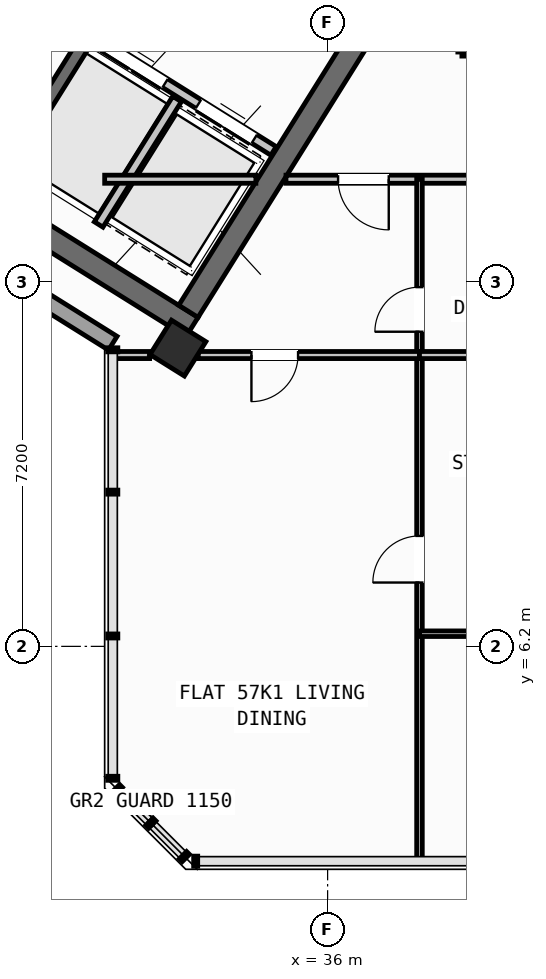
"""IFC4 building model, lengths in metres.
Left out: names, types, materials, properties, quantities, classifications, styles, units other than length and angle.
Written with IfcOpenShell. Run it as: python <this file> out.ifc"""

import sys

from ifc_helpers import new_model, si_unit, direction, frame, frame_2d, origin, origin_2d, place, context, subcontext, project, spatial, rectangle, hollow_rectangle, extrude, source, transform, mapped, element, fill, save


model = new_model("IFC4")
c1 = context("Model", 3, precision=1e-05, world=origin(), true_north=direction((0.0, 1.0)))
c2 = subcontext(c1, "Body", "Model", "MODEL_VIEW")
j1 = project(units=[si_unit("LENGTHUNIT", "METRE"), si_unit("PLANEANGLEUNIT", "RADIAN")], contexts=[c1])
p1 = place(None, origin())
s1 = spatial("IfcSite", under=j1, at=p1, CompositionType="ELEMENT")
p2 = place(p1, origin())
s2 = spatial("IfcBuilding", under=s1, at=p2, CompositionType="ELEMENT")
p3 = place(p2, frame((0.0, 0.0, 225.6)))
s3 = spatial("IfcBuildingStorey", under=s2, at=p3, CompositionType="ELEMENT", Elevation=225.6)
p4 = place(p3, frame((33.324, 12.503, 0.0), z_axis=(0.0, 0.0, 1.0), x_axis=(-0.848043529849, 0.529926571782, 0.0)))
e1 = element("IfcWall", 1, at=p4, inside=s3, PredefinedType="SHEAR", context=c2, shape_type="SweptSolid", body=[
    extrude(rectangle(XDim=13.04, YDim=0.45, at=frame_2d((6.52, 0.0))), origin(), (0.0, 0.0, 1.0), 3.35),
])
p5 = place(p3, frame((36.683, 18.304, 0.0), z_axis=(0.0, 0.0, 1.0), x_axis=(-0.529904039071, -0.848057609704, 0.0)))
e2 = element("IfcWall", 2, at=p5, inside=s3, PredefinedType="SHEAR", context=c2, shape_type="SweptSolid", body=[
    extrude(rectangle(XDim=6.475, YDim=0.45, at=frame_2d((3.238, 0.0))), origin(), (0.0, 0.0, 1.0), 3.35),
])
m1 = source(origin(), c2, "Body", "SweptSolid", [
    extrude(hollow_rectangle(XDim=0.8, YDim=0.8, WallThickness=0.032, at=origin_2d()), origin(), (0.0, 0.0, 1.0), 3.6),
])
p6 = place(p3, frame((33.046, 12.087, 0.0), z_axis=(0.0, 0.0, 1.0), x_axis=(-0.848048096156, 0.529919264233, 0.0)))
e3 = element("IfcColumn", 3, at=p6, inside=s3, PredefinedType="COLUMN", context=c2, shape_type="MappedRepresentation", body=[
    mapped(m1, transform((0.0, 0.0, 0.0), scale=1.0)),
])
p7 = place(p3, frame((31.76, 12.183, 0.0), z_axis=(0.0, 0.0, 1.0), x_axis=(-0.848047074256, 0.529920899612, 0.0)))
e4 = element("IfcWall", 4, at=p7, inside=s3, PredefinedType="STANDARD", context=c2, shape_type="SweptSolid", body=[
    extrude(rectangle(XDim=30.652, YDim=0.32, at=frame_2d((15.326, 0.0))), origin(), (0.0, 0.0, 1.0), 3.35),
])
p8 = place(p7, frame((15.166, 0.0, 0.0)))
e5 = element("IfcOpeningElement", 5, at=p8, cuts=e4, PredefinedType="OPENING", context=c2, shape_type="SweptSolid", body=[
    extrude(rectangle(XDim=1.2, YDim=2.15, at=frame_2d((0.6, 1.075))), frame((0.0, 0.17, 0.0), z_axis=(0.0, -1.0, 0.0), x_axis=(1.0, 0.0, 0.0)), (0.0, 0.0, 1.0), 0.34),
])
p9 = place(p7, frame((2.24, 0.0, 0.9)))
e6 = element("IfcOpeningElement", 6, at=p9, cuts=e4, PredefinedType="OPENING", context=c2, shape_type="SweptSolid", body=[
    extrude(rectangle(XDim=1.65, YDim=1.45, at=frame_2d((0.825, 0.725))), frame((0.0, 0.17, 0.0), z_axis=(0.0, -1.0, 0.0), x_axis=(1.0, 0.0, 0.0)), (0.0, 0.0, 1.0), 0.34),
])
p10 = place(p7, frame((7.469, 0.0, 0.9)))
e7 = element("IfcOpeningElement", 7, at=p10, cuts=e4, PredefinedType="OPENING", context=c2, shape_type="SweptSolid", body=[
    extrude(rectangle(XDim=1.65, YDim=1.45, at=frame_2d((0.825, 0.725))), frame((0.0, 0.17, 0.0), z_axis=(0.0, -1.0, 0.0), x_axis=(1.0, 0.0, 0.0)), (0.0, 0.0, 1.0), 0.34),
])
p11 = place(p7, frame((12.623, 0.0, 1.0)))
e8 = element("IfcOpeningElement", 8, at=p11, cuts=e4, PredefinedType="OPENING", context=c2, shape_type="SweptSolid", body=[
    extrude(rectangle(XDim=0.9, YDim=1.25, at=frame_2d((0.45, 0.625))), frame((0.0, 0.17, 0.0), z_axis=(0.0, -1.0, 0.0), x_axis=(1.0, 0.0, 0.0)), (0.0, 0.0, 1.0), 0.34),
])
p12 = place(p7, frame((19.556, 0.0, 1.0)))
e9 = element("IfcOpeningElement", 9, at=p12, cuts=e4, PredefinedType="OPENING", context=c2, shape_type="SweptSolid", body=[
    extrude(rectangle(XDim=0.9, YDim=1.25, at=frame_2d((0.45, 0.625))), frame((0.0, 0.17, 0.0), z_axis=(0.0, -1.0, 0.0), x_axis=(1.0, 0.0, 0.0)), (0.0, 0.0, 1.0), 0.34),
])
p13 = place(p7, frame((21.95, 0.0, 1.0)))
e10 = element("IfcOpeningElement", 10, at=p13, cuts=e4, PredefinedType="OPENING", context=c2, shape_type="SweptSolid", body=[
    extrude(rectangle(XDim=0.9, YDim=1.25, at=frame_2d((0.45, 0.625))), frame((0.0, 0.17, 0.0), z_axis=(0.0, -1.0, 0.0), x_axis=(1.0, 0.0, 0.0)), (0.0, 0.0, 1.0), 0.34),
])
p14 = place(p7, frame((26.983, 0.0, 0.9)))
e11 = element("IfcOpeningElement", 11, at=p14, cuts=e4, PredefinedType="OPENING", context=c2, shape_type="SweptSolid", body=[
    extrude(rectangle(XDim=1.35, YDim=1.45, at=frame_2d((0.675, 0.725))), frame((0.0, 0.17, 0.0), z_axis=(0.0, -1.0, 0.0), x_axis=(1.0, 0.0, 0.0)), (0.0, 0.0, 1.0), 0.34),
])
p15 = place(p3, frame((31.288, 18.256, 0.0), z_axis=(0.0, 0.0, 1.0), x_axis=(-0.529943379326, -0.848033026897, 0.0)))
e12 = element("IfcWall", 12, at=p15, inside=s3, PredefinedType="SHEAR", context=c2, shape_type="SweptSolid", body=[
    extrude(rectangle(XDim=3.16, YDim=0.26, at=frame_2d((1.58, 0.0))), origin(), (0.0, 0.0, 1.0), 3.35),
])
p16 = place(p3, frame((34.933, 15.978, 0.0), z_axis=(0.0, 0.0, 1.0), x_axis=(-0.848055739377, 0.529907032327, 0.0)))
e13 = element("IfcWall", 13, at=p16, inside=s3, PredefinedType="STANDARD", context=c2, shape_type="SweptSolid", body=[
    extrude(rectangle(XDim=4.298, YDim=0.2, at=frame_2d((2.149, 0.0))), origin(), (0.0, 0.0, 1.0), 3.34),
])
p17 = place(p16, frame((0.448, 0.0, 0.0)))
e14 = element("IfcOpeningElement", 14, at=p17, cuts=e13, PredefinedType="OPENING", context=c2, shape_type="SweptSolid", body=[
    extrude(rectangle(XDim=1.3, YDim=2.2, at=frame_2d((0.65, 1.1))), frame((0.0, 0.11, 0.0), z_axis=(0.0, -1.0, 0.0), x_axis=(1.0, 0.0, 0.0)), (0.0, 0.0, 1.0), 0.22),
])
p18 = place(p16, frame((2.523, 0.0, 0.0)))
e15 = element("IfcOpeningElement", 15, at=p18, cuts=e13, PredefinedType="OPENING", context=c2, shape_type="SweptSolid", body=[
    extrude(rectangle(XDim=1.45, YDim=2.25, at=frame_2d((0.725, 1.125))), frame((0.0, 0.11, 0.0), z_axis=(0.0, -1.0, 0.0), x_axis=(1.0, 0.0, 0.0)), (0.0, 0.0, 1.0), 0.22),
])
p19 = place(p3, frame((33.029, 17.003, 0.0), z_axis=(0.0, 0.0, 1.0), x_axis=(-0.529916267533, -0.848049968695, 0.0)))
e16 = element("IfcWall", 16, at=p19, inside=s3, PredefinedType="STANDARD", context=c2, shape_type="SweptSolid", body=[
    extrude(rectangle(XDim=2.92, YDim=0.2, at=frame_2d((1.46, 0.0))), origin(), (0.0, 0.0, 1.0), 3.34),
])
p20 = place(p3, frame((31.6, 15.42, 0.0), z_axis=(0.0, 0.0, 1.0), x_axis=(1.0, 0.0, 0.0)))
e17 = element("IfcWall", 17, at=p20, inside=s3, PredefinedType="PARTITIONING", context=c2, shape_type="SweptSolid", body=[
    extrude(rectangle(XDim=2.984, YDim=0.16, at=frame_2d((1.492, 0.0))), origin(), (0.0, 0.0, 1.0), 3.34),
])
p21 = place(p3, frame((35.178, 15.42, 0.0), z_axis=(0.0, 0.0, 1.0), x_axis=(1.0, 0.0, 0.0)))
e18 = element("IfcWall", 18, at=p21, inside=s3, PredefinedType="PARTITIONING", context=c2, shape_type="SweptSolid", body=[
    extrude(rectangle(XDim=15.552, YDim=0.16, at=frame_2d((7.776, 0.0))), origin(), (0.0, 0.0, 1.0), 3.34),
])
p22 = place(p21, frame((1.028, 0.0, 0.0)))
e19 = element("IfcOpeningElement", 19, at=p22, cuts=e18, PredefinedType="OPENING", context=c2, shape_type="SweptSolid", body=[
    extrude(rectangle(XDim=1.0, YDim=2.1, at=frame_2d((0.5, 1.05))), frame((0.0, 0.09, 0.0), z_axis=(0.0, -1.0, 0.0), x_axis=(1.0, 0.0, 0.0)), (0.0, 0.0, 1.0), 0.18),
])
p23 = place(p21, frame((8.858, 0.0, 0.0)))
e20 = element("IfcOpeningElement", 20, at=p23, cuts=e18, PredefinedType="OPENING", context=c2, shape_type="SweptSolid", body=[
    extrude(rectangle(XDim=1.0, YDim=2.1, at=frame_2d((0.5, 1.05))), frame((0.0, 0.09, 0.0), z_axis=(0.0, -1.0, 0.0), x_axis=(1.0, 0.0, 0.0)), (0.0, 0.0, 1.0), 0.18),
])
p24 = place(p3, frame((38.65, 17.93, 0.0), z_axis=(0.0, 0.0, 1.0), x_axis=(1.0, 0.0, 0.0)))
e21 = element("IfcWall", 21, at=p24, inside=s3, PredefinedType="PARTITIONING", context=c2, shape_type="SweptSolid", body=[
    extrude(rectangle(XDim=9.95, YDim=0.16, at=frame_2d((4.975, 0.0))), origin(), (0.0, 0.0, 1.0), 3.34),
])
p25 = place(p24, frame((4.475, 0.0, 0.0)))
e22 = element("IfcOpeningElement", 22, at=p25, cuts=e21, PredefinedType="OPENING", context=c2, shape_type="SweptSolid", body=[
    extrude(rectangle(XDim=1.0, YDim=2.1, at=frame_2d((0.5, 1.05))), frame((0.0, 0.09, 0.0), z_axis=(0.0, -1.0, 0.0), x_axis=(1.0, 0.0, 0.0)), (0.0, 0.0, 1.0), 0.18),
])
p26 = place(p3, frame((37.813, 1.96, 0.0), z_axis=(0.0, 0.0, 1.0), x_axis=(0.0, 1.0, 0.0)))
e23 = element("IfcWall", 23, at=p26, inside=s3, PredefinedType="PARTITIONING", context=c2, shape_type="SweptSolid", body=[
    extrude(rectangle(XDim=13.46, YDim=0.11, at=frame_2d((6.73, 0.0))), origin(), (0.0, 0.0, 1.0), 3.34),
])
p27 = place(p26, frame((5.5, 0.0, 0.0)))
e24 = element("IfcOpeningElement", 24, at=p27, cuts=e23, PredefinedType="OPENING", context=c2, shape_type="SweptSolid", body=[
    extrude(rectangle(XDim=0.92, YDim=2.08, at=frame_2d((0.46, 1.04))), frame((0.0, 0.065, 0.0), z_axis=(0.0, -1.0, 0.0), x_axis=(1.0, 0.0, 0.0)), (0.0, 0.0, 1.0), 0.13),
])
p28 = place(p26, frame((10.45, 0.0, 0.0)))
e25 = element("IfcOpeningElement", 25, at=p28, cuts=e23, PredefinedType="OPENING", context=c2, shape_type="SweptSolid", body=[
    extrude(rectangle(XDim=0.88, YDim=2.08, at=frame_2d((0.44, 1.04))), frame((0.0, 0.065, 0.0), z_axis=(0.0, -1.0, 0.0), x_axis=(1.0, 0.0, 0.0)), (0.0, 0.0, 1.0), 0.13),
])
p29 = place(p3, frame((31.74, 11.95, 0.0), z_axis=(0.0, 0.0, 1.0), x_axis=(1.0, 0.0, 0.0)))
e26 = element("IfcWall", 26, at=p29, inside=s3, PredefinedType="PLUMBINGWALL", context=c2, shape_type="SweptSolid", body=[
    extrude(rectangle(XDim=0.748, YDim=0.14, at=frame_2d((0.374, 0.0))), origin(), (0.0, 0.0, 1.0), 3.34),
])
p30 = place(p3, frame((33.447, 11.95, 0.0), z_axis=(0.0, 0.0, 1.0), x_axis=(1.0, 0.0, 0.0)))
e27 = element("IfcWall", 27, at=p30, inside=s3, PredefinedType="PLUMBINGWALL", context=c2, shape_type="SweptSolid", body=[
    extrude(rectangle(XDim=4.366, YDim=0.14, at=frame_2d((2.183, 0.0))), origin(), (0.0, 0.0, 1.0), 2.525),
])
p31 = place(p30, frame((1.05, 0.0, 0.0)))
e28 = element("IfcOpeningElement", 28, at=p31, cuts=e27, PredefinedType="OPENING", context=c2, shape_type="SweptSolid", body=[
    extrude(rectangle(XDim=0.92, YDim=2.08, at=frame_2d((0.46, 1.04))), frame((0.0, 0.08, 0.0), z_axis=(0.0, -1.0, 0.0), x_axis=(1.0, 0.0, 0.0)), (0.0, 0.0, 1.0), 0.16),
])
p32 = place(p3, frame((37.813, 11.95, 0.0), z_axis=(0.0, 0.0, 1.0), x_axis=(1.0, 0.0, 0.0)))
e29 = element("IfcWall", 29, at=p32, inside=s3, PredefinedType="PLUMBINGWALL", context=c2, shape_type="SweptSolid", body=[
    extrude(rectangle(XDim=4.137, YDim=0.14, at=frame_2d((2.068, 0.0))), origin(), (0.0, 0.0, 1.0), 2.525),
])
p33 = place(p3, frame((37.813, 6.45, 0.0), z_axis=(0.0, 0.0, 1.0), x_axis=(1.0, 0.0, 0.0)))
e30 = element("IfcWall", 30, at=p33, inside=s3, PredefinedType="PARTITIONING", context=c2, shape_type="SweptSolid", body=[
    extrude(rectangle(XDim=4.137, YDim=0.11, at=frame_2d((2.068, 0.0))), origin(), (0.0, 0.0, 1.0), 3.34),
])
p34 = place(p33, frame((1.608, 0.0, 0.0)))
e31 = element("IfcOpeningElement", 31, at=p34, cuts=e30, PredefinedType="OPENING", context=c2, shape_type="SweptSolid", body=[
    extrude(rectangle(XDim=0.92, YDim=2.08, at=frame_2d((0.46, 1.04))), frame((0.0, 0.065, 0.0), z_axis=(0.0, -1.0, 0.0), x_axis=(1.0, 0.0, 0.0)), (0.0, 0.0, 1.0), 0.13),
])
m2 = source(origin(), c2, "Body", "SweptSolid", [
    extrude(rectangle(XDim=1.3, YDim=2.2, at=frame_2d((0.65, 1.1))), frame((0.0, 0.025, 0.0), z_axis=(0.0, -1.0, 0.0), x_axis=(1.0, 0.0, 0.0)), (0.0, 0.0, 1.0), 0.05),
])
p35 = place(p17, origin())
e32 = element("IfcDoor", 32, at=p35, inside=s3, OperationType="DOUBLE_DOOR_SLIDING", PredefinedType="DOOR", context=c2, shape_type="MappedRepresentation", body=[
    mapped(m2, transform((0.0, 0.0, 0.0), scale=1.0)),
])
fill(e14, e32)
m3 = source(origin(), c2, "Body", "SweptSolid", [
    extrude(rectangle(XDim=1.45, YDim=2.25, at=frame_2d((0.725, 1.125))), frame((0.0, 0.025, 0.0), z_axis=(0.0, -1.0, 0.0), x_axis=(1.0, 0.0, 0.0)), (0.0, 0.0, 1.0), 0.05),
])
p36 = place(p18, origin())
e33 = element("IfcDoor", 33, at=p36, inside=s3, OperationType="DOUBLE_DOOR_SLIDING", PredefinedType="DOOR", context=c2, shape_type="MappedRepresentation", body=[
    mapped(m3, transform((0.0, 0.0, 0.0), scale=1.0)),
])
fill(e15, e33)
m4 = source(origin(), c2, "Body", "SweptSolid", [
    extrude(rectangle(XDim=0.92, YDim=2.08, at=frame_2d((0.46, 1.04))), frame((0.0, 0.025, 0.0), z_axis=(0.0, -1.0, 0.0), x_axis=(1.0, 0.0, 0.0)), (0.0, 0.0, 1.0), 0.05),
])
p37 = place(p27, origin())
e34 = element("IfcDoor", 34, at=p37, inside=s3, OperationType="SINGLE_SWING_LEFT", PredefinedType="DOOR", context=c2, shape_type="MappedRepresentation", body=[
    mapped(m4, transform((0.0, 0.0, 0.0), scale=1.0)),
])
fill(e24, e34)
m5 = source(origin(), c2, "Body", "SweptSolid", [
    extrude(rectangle(XDim=1.0, YDim=2.1, at=frame_2d((0.5, 1.05))), frame((0.0, 0.025, 0.0), z_axis=(0.0, -1.0, 0.0), x_axis=(1.0, 0.0, 0.0)), (0.0, 0.0, 1.0), 0.05),
])
p38 = place(p22, frame((1.0, 0.0, 0.0), z_axis=(0.0, 0.0, 1.0), x_axis=(-1.0, 0.0, 0.0)))
e35 = element("IfcDoor", 35, at=p38, inside=s3, OperationType="SINGLE_SWING_LEFT", PredefinedType="DOOR", context=c2, shape_type="MappedRepresentation", body=[
    mapped(m5, transform((0.0, 0.0, 0.0), scale=1.0)),
])
fill(e19, e35)
p39 = place(p31, frame((0.92, 0.0, 0.0), z_axis=(0.0, 0.0, 1.0), x_axis=(-1.0, 0.0, 0.0)))
e36 = element("IfcDoor", 36, at=p39, inside=s3, OperationType="SINGLE_SWING_RIGHT", PredefinedType="DOOR", context=c2, shape_type="MappedRepresentation", body=[
    mapped(m4, transform((0.0, 0.0, 0.0), scale=1.0)),
])
fill(e28, e36)
m6 = source(origin(), c2, "Body", "SweptSolid", [
    extrude(rectangle(XDim=0.88, YDim=2.08, at=frame_2d((0.44, 1.04))), frame((0.0, 0.025, 0.0), z_axis=(0.0, -1.0, 0.0), x_axis=(1.0, 0.0, 0.0)), (0.0, 0.0, 1.0), 0.05),
])
p40 = place(p28, origin())
e37 = element("IfcDoor", 37, at=p40, inside=s3, OperationType="SINGLE_SWING_LEFT", PredefinedType="DOOR", context=c2, shape_type="MappedRepresentation", body=[
    mapped(m6, transform((0.0, 0.0, 0.0), scale=1.0)),
])
fill(e25, e37)
save(model, sys.argv[1])
